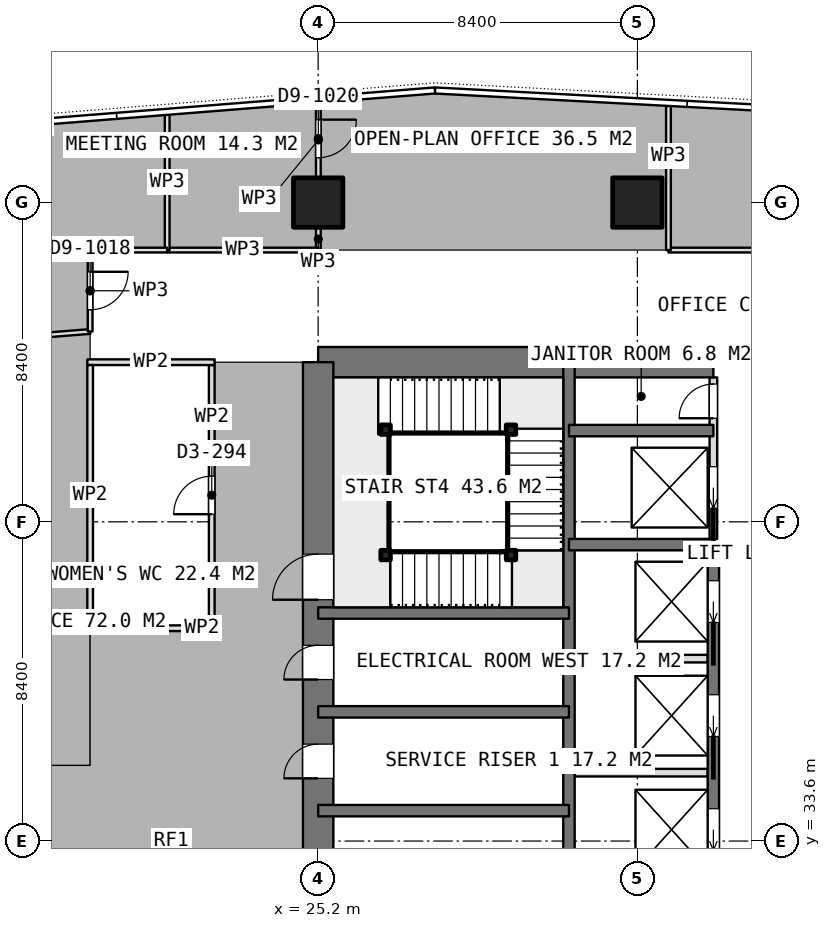
"""IFC4 building model, lengths in metres.
Left out: names, types, materials, properties, quantities, classifications, styles, units other than length and angle.
Written with IfcOpenShell. Run it as: python <this file> out.ifc"""

import sys

from ifc_helpers import new_model, si_unit, direction, frame, frame_2d, origin, origin_2d, place, context, subcontext, project, spatial, rectangle, extrude, element, fill, save


model = new_model("IFC4")
c1 = context("Model", 3, precision=1e-05, world=origin(), true_north=direction((0.0, 1.0)))
c2 = subcontext(c1, "Body", "Model", "MODEL_VIEW")
j1 = project(units=[si_unit("LENGTHUNIT", "METRE"), si_unit("PLANEANGLEUNIT", "RADIAN")], contexts=[c1])
p1 = place(None, origin())
s1 = spatial("IfcSite", under=j1, at=p1, CompositionType="ELEMENT")
p2 = place(p1, origin())
s2 = spatial("IfcBuilding", under=s1, at=p2, CompositionType="ELEMENT")
p3 = place(p2, frame((0.0, 0.0, 272.6)))
s3 = spatial("IfcBuildingStorey", under=s2, at=p3, CompositionType="ELEMENT", Elevation=272.6)
p4 = place(p3, frame((25.2, 46.2, 0.0), z_axis=(0.0, 0.0, 1.0), x_axis=(1.0, 0.0, 0.0)))
e1 = element("IfcWall", 1, at=p4, inside=s3, PredefinedType="SHEAR", context=c2, shape_type="SweptSolid", body=[
    extrude(rectangle(XDim=10.4, YDim=0.8, at=frame_2d((5.2, 0.0))), origin(), (0.0, 0.0, 1.0), 3.75),
])
p5 = place(p3, frame((25.2, 21.0, 0.0), z_axis=(0.0, 0.0, 1.0), x_axis=(0.0, 1.0, 0.0)))
e2 = element("IfcWall", 2, at=p5, inside=s3, PredefinedType="SHEAR", context=c2, shape_type="SweptSolid", body=[
    extrude(rectangle(XDim=25.2, YDim=0.8, at=frame_2d((12.6, 0.0))), origin(), (0.0, 0.0, 1.0), 3.75),
])
p6 = place(p5, frame((7.8, 0.0, 0.0)))
e3 = element("IfcOpeningElement", 3, at=p6, cuts=e2, PredefinedType="OPENING", context=c2, shape_type="SweptSolid", body=[
    extrude(rectangle(XDim=1.2, YDim=2.1, at=frame_2d((0.6, 1.05))), frame((0.0, 0.41, 0.0), z_axis=(0.0, -1.0, 0.0), x_axis=(1.0, 0.0, 0.0)), (0.0, 0.0, 1.0), 0.82),
])
p7 = place(p5, frame((14.25, 0.0, 0.0)))
e4 = element("IfcOpeningElement", 4, at=p7, cuts=e2, PredefinedType="OPENING", context=c2, shape_type="SweptSolid", body=[
    extrude(rectangle(XDim=0.9, YDim=2.1, at=frame_2d((0.45, 1.05))), frame((0.0, 0.41, 0.0), z_axis=(0.0, -1.0, 0.0), x_axis=(1.0, 0.0, 0.0)), (0.0, 0.0, 1.0), 0.82),
])
p8 = place(p5, frame((16.85, 0.0, 0.0)))
e5 = element("IfcOpeningElement", 5, at=p8, cuts=e2, PredefinedType="OPENING", context=c2, shape_type="SweptSolid", body=[
    extrude(rectangle(XDim=0.9, YDim=2.1, at=frame_2d((0.45, 1.05))), frame((0.0, 0.41, 0.0), z_axis=(0.0, -1.0, 0.0), x_axis=(1.0, 0.0, 0.0)), (0.0, 0.0, 1.0), 0.82),
])
p9 = place(p5, frame((18.95, 0.0, 0.0)))
e6 = element("IfcOpeningElement", 6, at=p9, cuts=e2, PredefinedType="OPENING", context=c2, shape_type="SweptSolid", body=[
    extrude(rectangle(XDim=1.2, YDim=2.1, at=frame_2d((0.6, 1.05))), frame((0.0, 0.41, 0.0), z_axis=(0.0, -1.0, 0.0), x_axis=(1.0, 0.0, 0.0)), (0.0, 0.0, 1.0), 0.82),
])
p10 = place(p3, frame((31.8, 21.0, 0.0), z_axis=(0.0, 0.0, 1.0), x_axis=(0.0, 1.0, 0.0)))
e7 = element("IfcWall", 7, at=p10, inside=s3, PredefinedType="SHEAR", context=c2, shape_type="SweptSolid", body=[
    extrude(rectangle(XDim=25.2, YDim=0.3, at=frame_2d((12.6, 0.0))), origin(), (0.0, 0.0, 1.0), 3.75),
])
p11 = place(p3, frame((35.6, 23.4, 0.0), z_axis=(0.0, 0.0, 1.0), x_axis=(0.0, 1.0, 0.0)))
e8 = element("IfcWall", 8, at=p11, inside=s3, PredefinedType="SHEAR", context=c2, shape_type="SweptSolid", body=[
    extrude(rectangle(XDim=18.0, YDim=0.3, at=frame_2d((9.0, 0.0))), origin(), (0.0, 0.0, 1.0), 3.75),
])
p12 = place(p11, frame((0.95, 0.0, 0.0)))
e9 = element("IfcOpeningElement", 9, at=p12, cuts=e8, PredefinedType="OPENING", context=c2, shape_type="SweptSolid", body=[
    extrude(rectangle(XDim=1.1, YDim=2.1, at=frame_2d((0.55, 1.05))), frame((0.0, 0.16, 0.0), z_axis=(0.0, -1.0, 0.0), x_axis=(1.0, 0.0, 0.0)), (0.0, 0.0, 1.0), 0.32),
])
p13 = place(p11, frame((3.95, 0.0, 0.0)))
e10 = element("IfcOpeningElement", 10, at=p13, cuts=e8, PredefinedType="OPENING", context=c2, shape_type="SweptSolid", body=[
    extrude(rectangle(XDim=1.1, YDim=2.1, at=frame_2d((0.55, 1.05))), frame((0.0, 0.16, 0.0), z_axis=(0.0, -1.0, 0.0), x_axis=(1.0, 0.0, 0.0)), (0.0, 0.0, 1.0), 0.32),
])
p14 = place(p11, frame((6.95, 0.0, 0.0)))
e11 = element("IfcOpeningElement", 11, at=p14, cuts=e8, PredefinedType="OPENING", context=c2, shape_type="SweptSolid", body=[
    extrude(rectangle(XDim=1.1, YDim=2.1, at=frame_2d((0.55, 1.05))), frame((0.0, 0.16, 0.0), z_axis=(0.0, -1.0, 0.0), x_axis=(1.0, 0.0, 0.0)), (0.0, 0.0, 1.0), 0.32),
])
p15 = place(p11, frame((9.95, 0.0, 0.0)))
e12 = element("IfcOpeningElement", 12, at=p15, cuts=e8, PredefinedType="OPENING", context=c2, shape_type="SweptSolid", body=[
    extrude(rectangle(XDim=1.1, YDim=2.1, at=frame_2d((0.55, 1.05))), frame((0.0, 0.16, 0.0), z_axis=(0.0, -1.0, 0.0), x_axis=(1.0, 0.0, 0.0)), (0.0, 0.0, 1.0), 0.32),
])
p16 = place(p11, frame((12.95, 0.0, 0.0)))
e13 = element("IfcOpeningElement", 13, at=p16, cuts=e8, PredefinedType="OPENING", context=c2, shape_type="SweptSolid", body=[
    extrude(rectangle(XDim=1.1, YDim=2.1, at=frame_2d((0.55, 1.05))), frame((0.0, 0.16, 0.0), z_axis=(0.0, -1.0, 0.0), x_axis=(1.0, 0.0, 0.0)), (0.0, 0.0, 1.0), 0.32),
])
p17 = place(p11, frame((15.95, 0.0, 0.0)))
e14 = element("IfcOpeningElement", 14, at=p17, cuts=e8, PredefinedType="OPENING", context=c2, shape_type="SweptSolid", body=[
    extrude(rectangle(XDim=1.1, YDim=2.1, at=frame_2d((0.55, 1.05))), frame((0.0, 0.16, 0.0), z_axis=(0.0, -1.0, 0.0), x_axis=(1.0, 0.0, 0.0)), (0.0, 0.0, 1.0), 0.32),
])
for number, where, z_axis, x_axis in (
    (15, (31.8, 41.4, 0.0), (0.0, 0.0, 1.0), (1.0, 0.0, 0.0)),
    (16, (31.8, 44.4, 0.0), (0.0, 0.0, 1.0), (1.0, 0.0, 0.0)),
):
    element("IfcWall", number, at=place(p3, frame(where, z_axis=z_axis, x_axis=x_axis)), inside=s3, PredefinedType="SHEAR", context=c2, shape_type="SweptSolid", body=[
        extrude(rectangle(XDim=3.8, YDim=0.3, at=frame_2d((1.9, 0.0))), origin(), (0.0, 0.0, 1.0), 3.75),
    ])
for number, where, z_axis, x_axis in (
    (17, (25.2, 34.4, 0.0), (0.0, 0.0, 1.0), (1.0, 0.0, 0.0)),
    (18, (25.2, 37.0, 0.0), (0.0, 0.0, 1.0), (1.0, 0.0, 0.0)),
    (19, (25.2, 39.6, 0.0), (0.0, 0.0, 1.0), (1.0, 0.0, 0.0)),
):
    element("IfcWall", number, at=place(p3, frame(where, z_axis=z_axis, x_axis=x_axis)), inside=s3, PredefinedType="SHEAR", context=c2, shape_type="SweptSolid", body=[
        extrude(rectangle(XDim=6.6, YDim=0.3, at=frame_2d((3.3, 0.0))), origin(), (0.0, 0.0, 1.0), 3.75),
    ])
for number, where, z_axis, x_axis in (
    (20, (25.2, 50.4, 0.0), (0.0, 0.0, 1.0), (1.0, 0.0, 0.0)),
    (21, (33.6, 50.4, 0.0), (0.0, 0.0, 1.0), (1.0, 0.0, 0.0)),
):
    element("IfcColumn", number, at=place(p3, frame(where, z_axis=z_axis, x_axis=x_axis)), inside=s3, PredefinedType="COLUMN", context=c2, shape_type="SweptSolid", body=[
        extrude(rectangle(XDim=1.3, YDim=1.3, at=origin_2d()), origin(), (0.0, 0.0, 1.0), 3.75),
    ])
for number, where, z_axis, x_axis in (
    (22, (31.95, 35.4, 0.0), (0.0, 0.0, 1.0), (1.0, 0.0, 0.0)),
    (23, (31.95, 38.4, 0.0), (0.0, 0.0, 1.0), (1.0, 0.0, 0.0)),
):
    element("IfcWall", number, at=place(p3, frame(where, z_axis=z_axis, x_axis=x_axis)), inside=s3, PredefinedType="PARTITIONING", context=c2, shape_type="SweptSolid", body=[
        extrude(rectangle(XDim=3.5, YDim=0.2, at=frame_2d((1.75, 0.0))), origin(), (0.0, 0.0, 1.0), 3.5),
    ])
p18 = place(p3, frame((35.6, 41.55, 0.0), z_axis=(0.0, 0.0, 1.0), x_axis=(0.0, 1.0, 0.0)))
e24 = element("IfcWall", 24, at=p18, inside=s3, PredefinedType="PARTITIONING", context=c2, shape_type="SweptSolid", body=[
    extrude(rectangle(XDim=4.25, YDim=0.2, at=frame_2d((2.125, 0.0))), origin(), (0.0, 0.0, 1.0), 3.5),
])
p19 = place(p18, frame((3.175, 0.0, 0.0)))
e25 = element("IfcOpeningElement", 25, at=p19, cuts=e24, PredefinedType="OPENING", context=c2, shape_type="SweptSolid", body=[
    extrude(rectangle(XDim=0.9, YDim=2.1, at=frame_2d((0.45, 1.05))), frame((0.0, 0.11, 0.0), z_axis=(0.0, -1.0, 0.0), x_axis=(1.0, 0.0, 0.0)), (0.0, 0.0, 1.0), 0.22),
])
p20 = place(p18, frame((0.8, 0.0, 0.0)))
e26 = element("IfcOpeningElement", 26, at=p20, cuts=e24, PredefinedType="OPENING", context=c2, shape_type="SweptSolid", body=[
    extrude(rectangle(XDim=1.1, YDim=2.1, at=frame_2d((0.55, 1.05))), frame((0.0, 0.11, 0.0), z_axis=(0.0, -1.0, 0.0), x_axis=(1.0, 0.0, 0.0)), (0.0, 0.0, 1.0), 0.22),
])
for number, where, z_axis, x_axis in (
    (27, (19.125, 39.2, 0.0), (0.0, 0.0, 1.0), (1.0, 0.0, 0.0)),
    (28, (19.125, 46.2, 0.0), (0.0, 0.0, 1.0), (1.0, 0.0, 0.0)),
):
    element("IfcWall", number, at=place(p3, frame(where, z_axis=z_axis, x_axis=x_axis)), inside=s3, PredefinedType="PARTITIONING", context=c2, shape_type="SweptSolid", body=[
        extrude(rectangle(XDim=3.35, YDim=0.15, at=frame_2d((1.675, 0.0))), origin(), (0.0, 0.0, 1.0), 3.5),
    ])
p21 = place(p3, frame((19.2, 39.275, 0.0), z_axis=(0.0, 0.0, 1.0), x_axis=(0.0, 1.0, 0.0)))
e29 = element("IfcWall", 29, at=p21, inside=s3, PredefinedType="PARTITIONING", context=c2, shape_type="SweptSolid", body=[
    extrude(rectangle(XDim=6.85, YDim=0.15, at=frame_2d((3.425, 0.0))), origin(), (0.0, 0.0, 1.0), 3.5),
])
p22 = place(p3, frame((22.4, 39.275, 0.0), z_axis=(0.0, 0.0, 1.0), x_axis=(0.0, 1.0, 0.0)))
e30 = element("IfcWall", 30, at=p22, inside=s3, PredefinedType="PARTITIONING", context=c2, shape_type="SweptSolid", body=[
    extrude(rectangle(XDim=6.85, YDim=0.15, at=frame_2d((3.425, 0.0))), origin(), (0.0, 0.0, 1.0), 3.5),
])
p23 = place(p22, frame((2.925, 0.0, 0.0)))
e31 = element("IfcOpeningElement", 31, at=p23, cuts=e30, PredefinedType="OPENING", context=c2, shape_type="SweptSolid", body=[
    extrude(rectangle(XDim=1.0, YDim=2.1, at=frame_2d((0.5, 1.05))), frame((0.0, 0.085, 0.0), z_axis=(0.0, -1.0, 0.0), x_axis=(1.0, 0.0, 0.0)), (0.0, 0.0, 1.0), 0.17),
])
p24 = place(p3, frame((52.123, 49.15, 0.0), z_axis=(0.0, 0.0, 1.0), x_axis=(-1.0, 0.0, 0.0)))
e32 = element("IfcWall", 32, at=p24, inside=s3, PredefinedType="PARTITIONING", context=c2, shape_type="SweptSolid", body=[
    extrude(rectangle(XDim=17.705, YDim=0.125, at=frame_2d((8.853, 0.0))), origin(), (0.0, 0.0, 1.0), 3.5),
])
p25 = place(p24, frame((7.553, 0.0, 0.0)))
e33 = element("IfcOpeningElement", 33, at=p25, cuts=e32, PredefinedType="OPENING", context=c2, shape_type="SweptSolid", body=[
    extrude(rectangle(XDim=1.8, YDim=2.1, at=frame_2d((0.9, 1.05))), frame((0.0, 0.073, 0.0), z_axis=(0.0, -1.0, 0.0), x_axis=(1.0, 0.0, 0.0)), (0.0, 0.0, 1.0), 0.145),
])
p26 = place(p3, frame((34.418, 49.15, 0.0), z_axis=(0.0, 0.0, 1.0), x_axis=(0.0, 1.0, 0.0)))
e34 = element("IfcWall", 34, at=p26, inside=s3, PredefinedType="PARTITIONING", context=c2, shape_type="SweptSolid", body=[
    extrude(rectangle(XDim=3.793, YDim=0.125, at=frame_2d((1.896, 0.0))), origin(), (0.0, 0.0, 1.0), 3.5),
])
p27 = place(p3, frame((25.205, 53.025, 0.0), z_axis=(0.0, 0.0, 1.0), x_axis=(0.0, -1.0, 0.0)))
e35 = element("IfcWall", 35, at=p27, inside=s3, PredefinedType="PARTITIONING", context=c2, shape_type="SweptSolid", body=[
    extrude(rectangle(XDim=1.955, YDim=0.125, at=frame_2d((0.978, 0.0))), origin(), (0.0, 0.0, 1.0), 3.5),
])
p28 = place(p27, frame((0.443, 0.0, 0.0)))
e36 = element("IfcOpeningElement", 36, at=p28, cuts=e35, PredefinedType="OPENING", context=c2, shape_type="SweptSolid", body=[
    extrude(rectangle(XDim=1.0, YDim=2.1, at=frame_2d((0.5, 1.05))), frame((0.0, 0.073, 0.0), z_axis=(0.0, -1.0, 0.0), x_axis=(1.0, 0.0, 0.0)), (0.0, 0.0, 1.0), 0.145),
])
p29 = place(p3, frame((25.205, 49.73, 0.0), z_axis=(0.0, 0.0, 1.0), x_axis=(0.0, -1.0, 0.0)))
e37 = element("IfcWall", 37, at=p29, inside=s3, PredefinedType="PARTITIONING", context=c2, shape_type="SweptSolid", body=[
    extrude(rectangle(XDim=0.58, YDim=0.125, at=frame_2d((0.29, 0.0))), origin(), (0.0, 0.0, 1.0), 3.5),
])
p30 = place(p3, frame((25.205, 49.15, 0.0), z_axis=(0.0, 0.0, 1.0), x_axis=(-1.0, 0.0, 0.0)))
e38 = element("IfcWall", 38, at=p30, inside=s3, PredefinedType="PARTITIONING", context=c2, shape_type="SweptSolid", body=[
    extrude(rectangle(XDim=3.978, YDim=0.125, at=frame_2d((1.989, 0.0))), origin(), (0.0, 0.0, 1.0), 3.5),
])
p31 = place(p3, frame((21.227, 49.15, 0.0), z_axis=(0.0, 0.0, 1.0), x_axis=(0.0, 1.0, 0.0)))
e39 = element("IfcWall", 39, at=p31, inside=s3, PredefinedType="PARTITIONING", context=c2, shape_type="SweptSolid", body=[
    extrude(rectangle(XDim=3.558, YDim=0.125, at=frame_2d((1.779, 0.0))), origin(), (0.0, 0.0, 1.0), 3.5),
])
p32 = place(p3, frame((19.2, 47.008, 0.0), z_axis=(0.0, 0.0, 1.0), x_axis=(-0.996842300725, -0.079406721921, 0.0)))
e40 = element("IfcWall", 40, at=p32, inside=s3, PredefinedType="PARTITIONING", context=c2, shape_type="SweptSolid", body=[
    extrude(rectangle(XDim=6.02, YDim=0.125, at=frame_2d((3.01, 0.0))), origin(), (0.0, 0.0, 1.0), 3.5),
])
p33 = place(p3, frame((21.226, 49.15, 0.0), z_axis=(0.0, 0.0, 1.0), x_axis=(-1.0, 0.0, 0.0)))
e41 = element("IfcWall", 41, at=p33, inside=s3, PredefinedType="PARTITIONING", context=c2, shape_type="SweptSolid", body=[
    extrude(rectangle(XDim=2.026, YDim=0.125, at=frame_2d((1.013, 0.0))), origin(), (0.0, 0.0, 1.0), 3.5),
])
p34 = place(p3, frame((19.2, 49.15, 0.0), z_axis=(0.0, 0.0, 1.0), x_axis=(0.0, -1.0, 0.0)))
e42 = element("IfcWall", 42, at=p34, inside=s3, PredefinedType="PARTITIONING", context=c2, shape_type="SweptSolid", body=[
    extrude(rectangle(XDim=2.142, YDim=0.125, at=frame_2d((1.071, 0.0))), origin(), (0.0, 0.0, 1.0), 3.5),
])
p35 = place(p34, frame((0.571, 0.0, 0.0)))
e43 = element("IfcOpeningElement", 43, at=p35, cuts=e42, PredefinedType="OPENING", context=c2, shape_type="SweptSolid", body=[
    extrude(rectangle(XDim=1.0, YDim=2.1, at=frame_2d((0.5, 1.05))), frame((0.0, 0.073, 0.0), z_axis=(0.0, -1.0, 0.0), x_axis=(1.0, 0.0, 0.0)), (0.0, 0.0, 1.0), 0.145),
])
for number, where, z_axis, x_axis in (
    (44, (26.975, 41.125, 0.0), (0.0, 0.0, 1.0), (1.0, 0.0, 0.0)),
    (45, (30.275, 41.125, 0.0), (0.0, 0.0, 1.0), (1.0, 0.0, 0.0)),
    (46, (30.275, 44.425, 0.0), (0.0, 0.0, 1.0), (1.0, 0.0, 0.0)),
    (47, (26.975, 44.425, 0.0), (0.0, 0.0, 1.0), (1.0, 0.0, 0.0)),
):
    element("IfcColumn", number, at=place(p3, frame(where, z_axis=z_axis, x_axis=x_axis)), inside=s3, PredefinedType="COLUMN", context=c2, shape_type="SweptSolid", body=[
        extrude(rectangle(XDim=0.25, YDim=0.25, at=origin_2d()), origin(), (0.0, 0.0, 1.0), 3.75),
    ])
p36 = place(p7, origin())
e48 = element("IfcDoor", 48, at=p36, inside=s3, OperationType="SINGLE_SWING_LEFT", PredefinedType="DOOR", context=c2, shape_type="SweptSolid", body=[
    extrude(rectangle(XDim=0.9, YDim=2.1, at=frame_2d((0.45, 1.05))), frame((0.0, 0.025, 0.0), z_axis=(0.0, -1.0, 0.0), x_axis=(1.0, 0.0, 0.0)), (0.0, 0.0, 1.0), 0.05),
])
fill(e4, e48)
p37 = place(p8, origin())
e49 = element("IfcDoor", 49, at=p37, inside=s3, OperationType="SINGLE_SWING_LEFT", PredefinedType="DOOR", context=c2, shape_type="SweptSolid", body=[
    extrude(rectangle(XDim=0.9, YDim=2.1, at=frame_2d((0.45, 1.05))), frame((0.0, 0.025, 0.0), z_axis=(0.0, -1.0, 0.0), x_axis=(1.0, 0.0, 0.0)), (0.0, 0.0, 1.0), 0.05),
])
fill(e5, e49)
p38 = place(p19, origin())
e50 = element("IfcDoor", 50, at=p38, inside=s3, OperationType="SINGLE_SWING_LEFT", PredefinedType="DOOR", context=c2, shape_type="SweptSolid", body=[
    extrude(rectangle(XDim=0.9, YDim=2.1, at=frame_2d((0.45, 1.05))), frame((0.0, 0.025, 0.0), z_axis=(0.0, -1.0, 0.0), x_axis=(1.0, 0.0, 0.0)), (0.0, 0.0, 1.0), 0.05),
])
fill(e25, e50)
p39 = place(p15, origin())
e51 = element("IfcDoor", 51, at=p39, inside=s3, OperationType="SLIDING_TO_LEFT", PredefinedType="USERDEFINED", context=c2, shape_type="SweptSolid", body=[
    extrude(rectangle(XDim=1.1, YDim=2.1, at=frame_2d((0.55, 1.05))), frame((0.0, 0.025, 0.0), z_axis=(0.0, -1.0, 0.0), x_axis=(1.0, 0.0, 0.0)), (0.0, 0.0, 1.0), 0.05),
])
fill(e12, e51)
p40 = place(p16, origin())
e52 = element("IfcDoor", 52, at=p40, inside=s3, OperationType="SLIDING_TO_LEFT", PredefinedType="USERDEFINED", context=c2, shape_type="SweptSolid", body=[
    extrude(rectangle(XDim=1.1, YDim=2.1, at=frame_2d((0.55, 1.05))), frame((0.0, 0.025, 0.0), z_axis=(0.0, -1.0, 0.0), x_axis=(1.0, 0.0, 0.0)), (0.0, 0.0, 1.0), 0.05),
])
fill(e13, e52)
p41 = place(p17, origin())
e53 = element("IfcDoor", 53, at=p41, inside=s3, OperationType="SLIDING_TO_LEFT", PredefinedType="USERDEFINED", context=c2, shape_type="SweptSolid", body=[
    extrude(rectangle(XDim=1.1, YDim=2.1, at=frame_2d((0.55, 1.05))), frame((0.0, 0.025, 0.0), z_axis=(0.0, -1.0, 0.0), x_axis=(1.0, 0.0, 0.0)), (0.0, 0.0, 1.0), 0.05),
])
fill(e14, e53)
p42 = place(p20, origin())
e54 = element("IfcDoor", 54, at=p42, inside=s3, OperationType="SLIDING_TO_LEFT", PredefinedType="USERDEFINED", context=c2, shape_type="SweptSolid", body=[
    extrude(rectangle(XDim=1.1, YDim=2.1, at=frame_2d((0.55, 1.05))), frame((0.0, 0.025, 0.0), z_axis=(0.0, -1.0, 0.0), x_axis=(1.0, 0.0, 0.0)), (0.0, 0.0, 1.0), 0.05),
])
fill(e26, e54)
p43 = place(p23, origin())
e55 = element("IfcDoor", 55, at=p43, inside=s3, OperationType="SINGLE_SWING_LEFT", PredefinedType="DOOR", context=c2, shape_type="SweptSolid", body=[
    extrude(rectangle(XDim=1.0, YDim=2.1, at=frame_2d((0.5, 1.05))), frame((0.0, 0.025, 0.0), z_axis=(0.0, -1.0, 0.0), x_axis=(1.0, 0.0, 0.0)), (0.0, 0.0, 1.0), 0.05),
])
fill(e31, e55)
p44 = place(p28, origin())
e56 = element("IfcDoor", 56, at=p44, inside=s3, OperationType="SINGLE_SWING_LEFT", PredefinedType="DOOR", context=c2, shape_type="SweptSolid", body=[
    extrude(rectangle(XDim=1.0, YDim=2.1, at=frame_2d((0.5, 1.05))), frame((0.0, 0.025, 0.0), z_axis=(0.0, -1.0, 0.0), x_axis=(1.0, 0.0, 0.0)), (0.0, 0.0, 1.0), 0.05),
])
fill(e36, e56)
p45 = place(p35, origin())
e57 = element("IfcDoor", 57, at=p45, inside=s3, OperationType="SINGLE_SWING_LEFT", PredefinedType="DOOR", context=c2, shape_type="SweptSolid", body=[
    extrude(rectangle(XDim=1.0, YDim=2.1, at=frame_2d((0.5, 1.05))), frame((0.0, 0.025, 0.0), z_axis=(0.0, -1.0, 0.0), x_axis=(1.0, 0.0, 0.0)), (0.0, 0.0, 1.0), 0.05),
])
fill(e43, e57)
p46 = place(p9, origin())
e58 = element("IfcDoor", 58, at=p46, inside=s3, OperationType="SINGLE_SWING_RIGHT", PredefinedType="DOOR", context=c2, shape_type="SweptSolid", body=[
    extrude(rectangle(XDim=1.2, YDim=2.1, at=frame_2d((0.6, 1.05))), frame((0.0, 0.025, 0.0), z_axis=(0.0, -1.0, 0.0), x_axis=(1.0, 0.0, 0.0)), (0.0, 0.0, 1.0), 0.05),
])
fill(e6, e58)
save(model, sys.argv[1])
